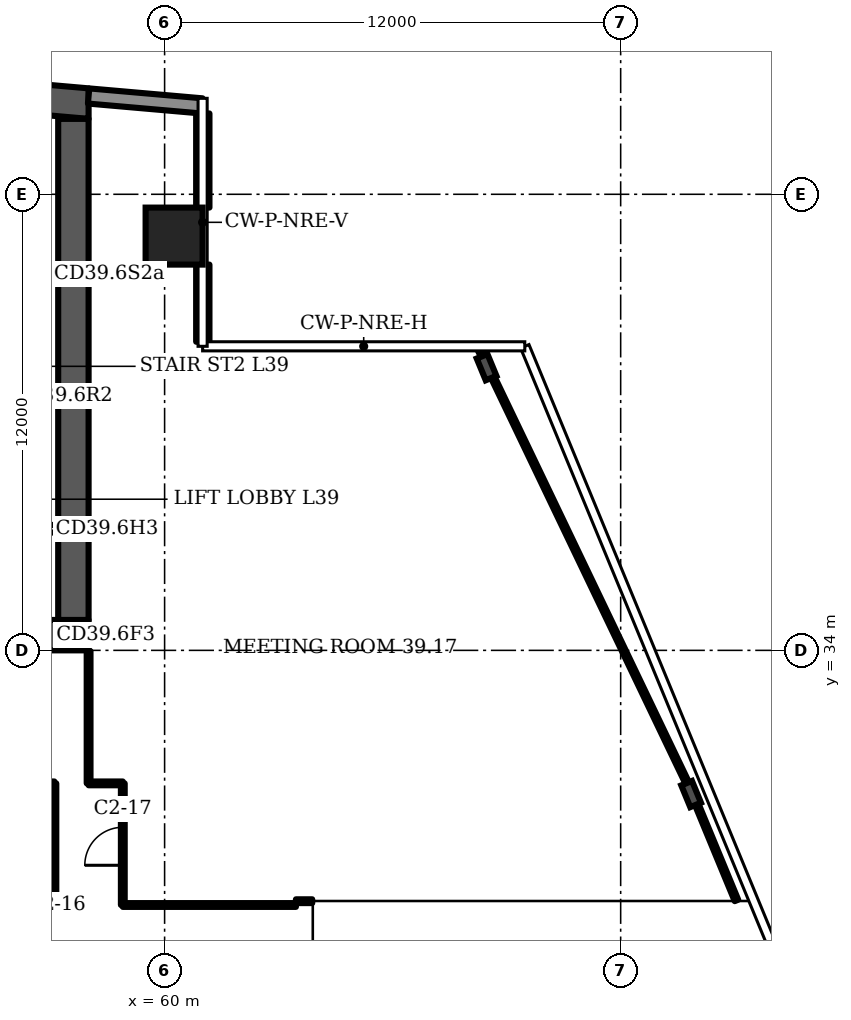
"""IFC4 building model, lengths in metres.
Left out: names, types, materials, properties, quantities, classifications, styles, units other than length and angle.
Written with IfcOpenShell. Run it as: python <this file> out.ifc"""

import sys

from ifc_helpers import new_model, si_unit, direction, frame, frame_2d, origin, origin_2d, place, context, subcontext, project, spatial, polyline, rectangle, i_section, outline, extrude, element, fill, save


model = new_model("IFC4")
c1 = context("Model", 3, precision=1e-05, world=origin(), true_north=direction((0.0, 1.0)))
c2 = subcontext(c1, "Body", "Model", "MODEL_VIEW")
j1 = project(units=[si_unit("LENGTHUNIT", "METRE"), si_unit("PLANEANGLEUNIT", "RADIAN")], contexts=[c1])
p1 = place(None, origin())
s1 = spatial("IfcSite", under=j1, at=p1, CompositionType="ELEMENT")
p2 = place(p1, origin())
s2 = spatial("IfcBuilding", under=s1, at=p2, CompositionType="ELEMENT")
p3 = place(p2, frame((0.0, 0.0, 162.7)))
s3 = spatial("IfcBuildingStorey", under=s2, at=p3, CompositionType="ELEMENT", Elevation=162.7)
p4 = place(p3, origin())
e1 = element("IfcWall", 1, at=p4, inside=s3, PredefinedType="SHEAR", context=c2, shape_type="SweptSolid", body=[
    extrude(outline(polyline([(16.0, 47.984), (37.0, 49.822), (58.0, 47.984), (58.0, 48.787), (37.0, 50.625), (16.0, 48.787), (16.0, 47.984)])), origin(), (0.0, 0.0, 1.0), 3.6),
])
p5 = place(p3, frame((16.0, 34.4, 0.0), z_axis=(0.0, 0.0, 1.0), x_axis=(1.0, 0.0, 0.0)))
e2 = element("IfcWall", 2, at=p5, inside=s3, PredefinedType="SHEAR", context=c2, shape_type="SweptSolid", body=[
    extrude(rectangle(XDim=42.0, YDim=0.8, at=frame_2d((21.0, 0.0))), origin(), (0.0, 0.0, 1.0), 3.6),
])
p6 = place(p5, frame((1.75, 0.0, 0.0)))
e3 = element("IfcOpeningElement", 3, at=p6, cuts=e2, PredefinedType="OPENING", context=c2, shape_type="SweptSolid", body=[
    extrude(rectangle(XDim=1.0, YDim=2.1, at=frame_2d((0.5, 1.05))), frame((0.0, 0.41, 0.0), z_axis=(0.0, -1.0, 0.0), x_axis=(1.0, 0.0, 0.0)), (0.0, 0.0, 1.0), 0.82),
])
p7 = place(p5, frame((4.65, 0.0, 0.0)))
e4 = element("IfcOpeningElement", 4, at=p7, cuts=e2, PredefinedType="OPENING", context=c2, shape_type="SweptSolid", body=[
    extrude(rectangle(XDim=1.0, YDim=2.1, at=frame_2d((0.5, 1.05))), frame((0.0, 0.41, 0.0), z_axis=(0.0, -1.0, 0.0), x_axis=(1.0, 0.0, 0.0)), (0.0, 0.0, 1.0), 0.82),
])
p8 = place(p5, frame((7.65, 0.0, 0.0)))
e5 = element("IfcOpeningElement", 5, at=p8, cuts=e2, PredefinedType="OPENING", context=c2, shape_type="SweptSolid", body=[
    extrude(rectangle(XDim=1.2, YDim=2.1, at=frame_2d((0.6, 1.05))), frame((0.0, 0.41, 0.0), z_axis=(0.0, -1.0, 0.0), x_axis=(1.0, 0.0, 0.0)), (0.0, 0.0, 1.0), 0.82),
])
p9 = place(p5, frame((14.767, 0.0, 0.0)))
e6 = element("IfcOpeningElement", 6, at=p9, cuts=e2, PredefinedType="OPENING", context=c2, shape_type="SweptSolid", body=[
    extrude(rectangle(XDim=1.1, YDim=2.1, at=frame_2d((0.55, 1.05))), frame((0.0, 0.41, 0.0), z_axis=(0.0, -1.0, 0.0), x_axis=(1.0, 0.0, 0.0)), (0.0, 0.0, 1.0), 0.82),
])
p10 = place(p5, frame((19.133, 0.0, 0.0)))
e7 = element("IfcOpeningElement", 7, at=p10, cuts=e2, PredefinedType="OPENING", context=c2, shape_type="SweptSolid", body=[
    extrude(rectangle(XDim=1.1, YDim=2.1, at=frame_2d((0.55, 1.05))), frame((0.0, 0.41, 0.0), z_axis=(0.0, -1.0, 0.0), x_axis=(1.0, 0.0, 0.0)), (0.0, 0.0, 1.0), 0.82),
])
p11 = place(p5, frame((16.8, 0.0, 0.0)))
e8 = element("IfcOpeningElement", 8, at=p11, cuts=e2, PredefinedType="OPENING", context=c2, shape_type="SweptSolid", body=[
    extrude(rectangle(XDim=1.4, YDim=2.1, at=frame_2d((0.7, 1.05))), frame((0.0, 0.41, 0.0), z_axis=(0.0, -1.0, 0.0), x_axis=(1.0, 0.0, 0.0)), (0.0, 0.0, 1.0), 0.82),
])
p12 = place(p5, frame((21.767, 0.0, 0.0)))
e9 = element("IfcOpeningElement", 9, at=p12, cuts=e2, PredefinedType="OPENING", context=c2, shape_type="SweptSolid", body=[
    extrude(rectangle(XDim=1.1, YDim=2.1, at=frame_2d((0.55, 1.05))), frame((0.0, 0.41, 0.0), z_axis=(0.0, -1.0, 0.0), x_axis=(1.0, 0.0, 0.0)), (0.0, 0.0, 1.0), 0.82),
])
p13 = place(p5, frame((23.95, 0.0, 0.0)))
e10 = element("IfcOpeningElement", 10, at=p13, cuts=e2, PredefinedType="OPENING", context=c2, shape_type="SweptSolid", body=[
    extrude(rectangle(XDim=1.1, YDim=2.1, at=frame_2d((0.55, 1.05))), frame((0.0, 0.41, 0.0), z_axis=(0.0, -1.0, 0.0), x_axis=(1.0, 0.0, 0.0)), (0.0, 0.0, 1.0), 0.82),
])
p14 = place(p5, frame((26.133, 0.0, 0.0)))
e11 = element("IfcOpeningElement", 11, at=p14, cuts=e2, PredefinedType="OPENING", context=c2, shape_type="SweptSolid", body=[
    extrude(rectangle(XDim=1.1, YDim=2.1, at=frame_2d((0.55, 1.05))), frame((0.0, 0.41, 0.0), z_axis=(0.0, -1.0, 0.0), x_axis=(1.0, 0.0, 0.0)), (0.0, 0.0, 1.0), 0.82),
])
p15 = place(p5, frame((33.15, 0.0, 0.0)))
e12 = element("IfcOpeningElement", 12, at=p15, cuts=e2, PredefinedType="OPENING", context=c2, shape_type="SweptSolid", body=[
    extrude(rectangle(XDim=1.2, YDim=2.1, at=frame_2d((0.6, 1.05))), frame((0.0, 0.41, 0.0), z_axis=(0.0, -1.0, 0.0), x_axis=(1.0, 0.0, 0.0)), (0.0, 0.0, 1.0), 0.82),
])
p16 = place(p5, frame((35.817, 0.0, 0.0)))
e13 = element("IfcOpeningElement", 13, at=p16, cuts=e2, PredefinedType="OPENING", context=c2, shape_type="SweptSolid", body=[
    extrude(rectangle(XDim=1.0, YDim=2.1, at=frame_2d((0.5, 1.05))), frame((0.0, 0.41, 0.0), z_axis=(0.0, -1.0, 0.0), x_axis=(1.0, 0.0, 0.0)), (0.0, 0.0, 1.0), 0.82),
])
p17 = place(p5, frame((39.95, 0.0, 0.0)))
e14 = element("IfcOpeningElement", 14, at=p17, cuts=e2, PredefinedType="OPENING", context=c2, shape_type="SweptSolid", body=[
    extrude(rectangle(XDim=1.0, YDim=2.1, at=frame_2d((0.5, 1.05))), frame((0.0, 0.41, 0.0), z_axis=(0.0, -1.0, 0.0), x_axis=(1.0, 0.0, 0.0)), (0.0, 0.0, 1.0), 0.82),
])
p18 = place(p5, frame((37.767, 0.0, 0.0)))
e15 = element("IfcOpeningElement", 15, at=p18, cuts=e2, PredefinedType="OPENING", context=c2, shape_type="SweptSolid", body=[
    extrude(rectangle(XDim=1.4, YDim=2.1, at=frame_2d((0.7, 1.05))), frame((0.0, 0.41, 0.0), z_axis=(0.0, -1.0, 0.0), x_axis=(1.0, 0.0, 0.0)), (0.0, 0.0, 1.0), 0.82),
])
p19 = place(p3, frame((57.6, 34.8, 0.0), z_axis=(0.0, 0.0, 1.0), x_axis=(0.0, 1.0, 0.0)))
e16 = element("IfcWall", 16, at=p19, inside=s3, PredefinedType="SHEAR", context=c2, shape_type="SweptSolid", body=[
    extrude(rectangle(XDim=13.184, YDim=0.8, at=frame_2d((6.592, 0.0))), origin(), (0.0, 0.0, 1.0), 3.6),
])
p20 = place(p3, frame((60.25, 44.9, 0.0), z_axis=(0.0, 0.0, 1.0), x_axis=(1.0, 0.0, 0.0)))
e17 = element("IfcColumn", 17, at=p20, inside=s3, PredefinedType="COLUMN", context=c2, shape_type="SweptSolid", body=[
    extrude(rectangle(XDim=1.5, YDim=1.5, at=origin_2d()), origin(), (0.0, 0.0, 1.0), 3.6),
])
for number, where, z_axis, x_axis in (
    (18, (73.854, 30.219, 0.0), (0.0, 0.0, 1.0), (0.924, 0.382, 0.0)),
    (19, (68.472, 41.45, 0.0), (0.0, 0.0, 1.0), (0.924, 0.382, 0.0)),
):
    element("IfcColumn", number, at=place(p3, frame(where, z_axis=z_axis, x_axis=x_axis)), inside=s3, PredefinedType="COLUMN", context=c2, shape_type="SweptSolid", body=[
        extrude(i_section(OverallWidth=0.305, OverallDepth=0.62, WebThickness=0.021, FlangeThickness=0.04, FilletRadius=0.027, at=origin_2d()), origin(), (0.0, 0.0, 1.0), 3.6),
    ])
p21 = place(p3, frame((60.983, 48.326, 0.0), z_axis=(0.0, 0.0, 1.0), x_axis=(-0.996194, 0.087168, 0.0)))
e20 = element("IfcWall", 20, at=p21, inside=s3, PredefinedType="SOLIDWALL", context=c2, shape_type="SweptSolid", body=[
    extrude(rectangle(XDim=2.994, YDim=0.4, at=frame_2d((1.497, 0.0))), origin(), (0.0, 0.0, 1.0), 3.2),
])
p22 = place(p3, frame((61.005, 42.12, 0.0), z_axis=(0.0, 0.0, 1.0), x_axis=(0.0, 1.0, 0.0)))
e21 = element("IfcWall", 21, at=p22, inside=s3, PredefinedType="SOLIDWALL", context=c2, shape_type="SweptSolid", body=[
    extrude(rectangle(XDim=2.03, YDim=0.35, at=frame_2d((1.015, 0.0))), origin(), (0.0, 0.0, 1.0), 1.0),
])
p23 = place(p3, frame((61.005, 45.65, 0.0), z_axis=(0.0, 0.0, 1.0), x_axis=(0.0, 1.0, 0.0)))
e22 = element("IfcWall", 22, at=p23, inside=s3, PredefinedType="SOLIDWALL", context=c2, shape_type="SweptSolid", body=[
    extrude(rectangle(XDim=2.477, YDim=0.35, at=frame_2d((1.238, 0.0))), origin(), (0.0, 0.0, 1.0), 1.0),
])
p24 = place(p3, frame((55.7, 37.2, 0.0), z_axis=(0.0, 0.0, 1.0), x_axis=(1.0, 0.0, 0.0)))
e23 = element("IfcWall", 23, at=p24, inside=s3, PredefinedType="PARTITIONING", context=c2, shape_type="SweptSolid", body=[
    extrude(rectangle(XDim=1.5, YDim=0.2, at=frame_2d((0.75, 0.0))), origin(), (0.0, 0.0, 1.0), 3.2),
])
p25 = place(p24, frame((0.25, 0.0, 0.0)))
e24 = element("IfcOpeningElement", 24, at=p25, cuts=e23, PredefinedType="OPENING", context=c2, shape_type="SweptSolid", body=[
    extrude(rectangle(XDim=1.0, YDim=2.1, at=frame_2d((0.5, 1.05))), frame((0.0, 0.11, 0.0), z_axis=(0.0, -1.0, 0.0), x_axis=(1.0, 0.0, 0.0)), (0.0, 0.0, 1.0), 0.22),
])
p26 = place(p3, frame((51.4, 40.7, 0.0), z_axis=(0.0, 0.0, 1.0), x_axis=(1.0, 0.0, 0.0)))
e25 = element("IfcWall", 25, at=p26, inside=s3, PredefinedType="PARTITIONING", context=c2, shape_type="SweptSolid", body=[
    extrude(rectangle(XDim=5.8, YDim=0.2, at=frame_2d((2.9, 0.0))), origin(), (0.0, 0.0, 1.0), 3.2),
])
p27 = place(p26, frame((0.367, 0.0, 0.0)))
e26 = element("IfcOpeningElement", 26, at=p27, cuts=e25, PredefinedType="OPENING", context=c2, shape_type="SweptSolid", body=[
    extrude(rectangle(XDim=1.1, YDim=2.1, at=frame_2d((0.55, 1.05))), frame((0.0, 0.11, 0.0), z_axis=(0.0, -1.0, 0.0), x_axis=(1.0, 0.0, 0.0)), (0.0, 0.0, 1.0), 0.22),
])
p28 = place(p26, frame((3.417, 0.0, 0.0)))
e27 = element("IfcOpeningElement", 27, at=p28, cuts=e25, PredefinedType="OPENING", context=c2, shape_type="SweptSolid", body=[
    extrude(rectangle(XDim=1.0, YDim=2.1, at=frame_2d((0.5, 1.05))), frame((0.0, 0.11, 0.0), z_axis=(0.0, -1.0, 0.0), x_axis=(1.0, 0.0, 0.0)), (0.0, 0.0, 1.0), 0.22),
])
p29 = place(p3, frame((51.4, 43.9, 0.0), z_axis=(0.0, 0.0, 1.0), x_axis=(1.0, 0.0, 0.0)))
e28 = element("IfcWall", 28, at=p29, inside=s3, PredefinedType="PARTITIONING", context=c2, shape_type="SweptSolid", body=[
    extrude(rectangle(XDim=5.8, YDim=0.2, at=frame_2d((2.9, 0.0))), origin(), (0.0, 0.0, 1.0), 3.2),
])
p30 = place(p29, frame((2.617, 0.0, 0.0)))
e29 = element("IfcOpeningElement", 29, at=p30, cuts=e28, PredefinedType="OPENING", context=c2, shape_type="SweptSolid", body=[
    extrude(rectangle(XDim=1.0, YDim=2.1, at=frame_2d((0.5, 1.05))), frame((0.0, 0.11, 0.0), z_axis=(0.0, -1.0, 0.0), x_axis=(1.0, 0.0, 0.0)), (0.0, 0.0, 1.0), 0.22),
])
p31 = place(p29, frame((4.5, 0.0, 0.0)))
e30 = element("IfcOpeningElement", 30, at=p31, cuts=e28, PredefinedType="OPENING", context=c2, shape_type="SweptSolid", body=[
    extrude(rectangle(XDim=1.0, YDim=2.1, at=frame_2d((0.5, 1.05))), frame((0.0, 0.11, 0.0), z_axis=(0.0, -1.0, 0.0), x_axis=(1.0, 0.0, 0.0)), (0.0, 0.0, 1.0), 0.22),
])
p32 = place(p3, frame((23.2, 27.3, 0.0), z_axis=(0.0, 0.0, 1.0), x_axis=(1.0, 0.0, 0.0)))
e31 = element("IfcWall", 31, at=p32, inside=s3, PredefinedType="PARTITIONING", context=c2, shape_type="SweptSolid", body=[
    extrude(rectangle(XDim=33.9, YDim=0.1, at=frame_2d((16.95, 0.0))), origin(), (0.0, 0.0, 1.0), 3.2),
])
p33 = place(p32, frame((16.3, 0.0, 0.0)))
e32 = element("IfcOpeningElement", 32, at=p33, cuts=e31, PredefinedType="OPENING", context=c2, shape_type="SweptSolid", body=[
    extrude(rectangle(XDim=1.0, YDim=2.1, at=frame_2d((0.5, 1.05))), frame((0.0, 0.06, 0.0), z_axis=(0.0, -1.0, 0.0), x_axis=(1.0, 0.0, 0.0)), (0.0, 0.0, 1.0), 0.12),
])
p34 = place(p32, frame((20.72, 0.0, 0.0)))
e33 = element("IfcOpeningElement", 33, at=p34, cuts=e31, PredefinedType="OPENING", context=c2, shape_type="SweptSolid", body=[
    extrude(rectangle(XDim=1.0, YDim=2.1, at=frame_2d((0.5, 1.05))), frame((0.0, 0.06, 0.0), z_axis=(0.0, -1.0, 0.0), x_axis=(1.0, 0.0, 0.0)), (0.0, 0.0, 1.0), 0.12),
])
p35 = place(p32, frame((23.54, 0.0, 0.0)))
e34 = element("IfcOpeningElement", 34, at=p35, cuts=e31, PredefinedType="OPENING", context=c2, shape_type="SweptSolid", body=[
    extrude(rectangle(XDim=1.0, YDim=2.1, at=frame_2d((0.5, 1.05))), frame((0.0, 0.06, 0.0), z_axis=(0.0, -1.0, 0.0), x_axis=(1.0, 0.0, 0.0)), (0.0, 0.0, 1.0), 0.12),
])
p36 = place(p32, frame((26.36, 0.0, 0.0)))
e35 = element("IfcOpeningElement", 35, at=p36, cuts=e31, PredefinedType="OPENING", context=c2, shape_type="SweptSolid", body=[
    extrude(rectangle(XDim=1.0, YDim=2.1, at=frame_2d((0.5, 1.05))), frame((0.0, 0.06, 0.0), z_axis=(0.0, -1.0, 0.0), x_axis=(1.0, 0.0, 0.0)), (0.0, 0.0, 1.0), 0.12),
])
p37 = place(p32, frame((29.18, 0.0, 0.0)))
e36 = element("IfcOpeningElement", 36, at=p37, cuts=e31, PredefinedType="OPENING", context=c2, shape_type="SweptSolid", body=[
    extrude(rectangle(XDim=1.0, YDim=2.1, at=frame_2d((0.5, 1.05))), frame((0.0, 0.06, 0.0), z_axis=(0.0, -1.0, 0.0), x_axis=(1.0, 0.0, 0.0)), (0.0, 0.0, 1.0), 0.12),
])
p38 = place(p32, frame((32.0, 0.0, 0.0)))
e37 = element("IfcOpeningElement", 37, at=p38, cuts=e31, PredefinedType="OPENING", context=c2, shape_type="SweptSolid", body=[
    extrude(rectangle(XDim=1.0, YDim=2.1, at=frame_2d((0.5, 1.05))), frame((0.0, 0.06, 0.0), z_axis=(0.0, -1.0, 0.0), x_axis=(1.0, 0.0, 0.0)), (0.0, 0.0, 1.0), 0.12),
])
p39 = place(p3, frame((57.1, 27.3, 0.0), z_axis=(0.0, 0.0, 1.0), x_axis=(0.0, 1.0, 0.0)))
e38 = element("IfcWall", 38, at=p39, inside=s3, PredefinedType="PARTITIONING", context=c2, shape_type="SweptSolid", body=[
    extrude(rectangle(XDim=3.2, YDim=0.1, at=frame_2d((1.6, 0.0))), origin(), (0.0, 0.0, 1.0), 3.2),
])
p40 = place(p3, frame((58.0, 30.5, 0.0), z_axis=(0.0, 0.0, 1.0), x_axis=(0.0, 1.0, 0.0)))
e39 = element("IfcWall", 39, at=p40, inside=s3, PredefinedType="PARTITIONING", context=c2, shape_type="SweptSolid", body=[
    extrude(rectangle(XDim=3.48, YDim=0.1, at=frame_2d((1.74, 0.0))), origin(), (0.0, 0.0, 1.0), 3.2),
])
p41 = place(p3, frame((58.0, 30.5, 0.0), z_axis=(0.0, 0.0, 1.0), x_axis=(1.0, 0.0, 0.0)))
e40 = element("IfcWall", 40, at=p41, inside=s3, PredefinedType="PARTITIONING", context=c2, shape_type="SweptSolid", body=[
    extrude(rectangle(XDim=0.9, YDim=0.1, at=frame_2d((0.45, 0.0))), origin(), (0.0, 0.0, 1.0), 3.2),
])
p42 = place(p3, frame((58.9, 27.3, 0.0), z_axis=(0.0, 0.0, 1.0), x_axis=(0.0, 1.0, 0.0)))
e41 = element("IfcWall", 41, at=p42, inside=s3, PredefinedType="PARTITIONING", context=c2, shape_type="SweptSolid", body=[
    extrude(rectangle(XDim=3.2, YDim=0.1, at=frame_2d((1.6, 0.0))), origin(), (0.0, 0.0, 1.0), 3.2),
])
p43 = place(p42, frame((1.045, 0.0, 0.0)))
e42 = element("IfcOpeningElement", 42, at=p43, cuts=e41, PredefinedType="OPENING", context=c2, shape_type="SweptSolid", body=[
    extrude(rectangle(XDim=1.0, YDim=2.1, at=frame_2d((0.5, 1.05))), frame((0.0, 0.06, 0.0), z_axis=(0.0, -1.0, 0.0), x_axis=(1.0, 0.0, 0.0)), (0.0, 0.0, 1.0), 0.12),
])
p44 = place(p3, frame((58.9, 27.3, 0.0), z_axis=(0.0, 0.0, 1.0), x_axis=(1.0, 0.0, 0.0)))
e43 = element("IfcWall", 43, at=p44, inside=s3, PredefinedType="PARTITIONING", context=c2, shape_type="SweptSolid", body=[
    extrude(rectangle(XDim=4.555, YDim=0.1, at=frame_2d((2.278, 0.0))), origin(), (0.0, 0.0, 1.0), 3.2),
])
p45 = place(p3, frame((63.455, 27.4, 0.0), z_axis=(0.0, 0.0, 1.0), x_axis=(1.0, 0.0, 0.0)))
e44 = element("IfcWall", 44, at=p45, inside=s3, PredefinedType="PARTITIONING", context=c2, shape_type="SweptSolid", body=[
    extrude(rectangle(XDim=0.429, YDim=0.1, at=frame_2d((0.215, 0.0))), origin(), (0.0, 0.0, 1.0), 3.2),
])
p46 = place(p3, frame((73.885, 30.23, 0.0), z_axis=(0.0, 0.0, 1.0), x_axis=(-0.432167, 0.90179, 0.0)))
e45 = element("IfcWall", 45, at=p46, inside=s3, PredefinedType="PARTITIONING", context=c2, shape_type="SweptSolid", body=[
    extrude(rectangle(XDim=13.036, YDim=0.1, at=frame_2d((6.518, 0.0))), origin(), (0.0, 0.0, 1.0), 3.2),
])
p47 = place(p3, frame((75.047, 27.42, 0.0), z_axis=(0.0, 0.0, 1.0), x_axis=(-0.382024, 0.924148, 0.0)))
e46 = element("IfcWall", 46, at=p47, inside=s3, PredefinedType="PARTITIONING", context=c2, shape_type="SweptSolid", body=[
    extrude(rectangle(XDim=3.041, YDim=0.1, at=frame_2d((1.521, 0.0))), origin(), (0.0, 0.0, 1.0), 2.58),
])
p48 = place(p3, frame((44.15, 30.5, 0.0), z_axis=(0.0, 0.0, 1.0), x_axis=(1.0, 0.0, 0.0)))
e47 = element("IfcWall", 47, at=p48, inside=s3, PredefinedType="PARTITIONING", context=c2, shape_type="SweptSolid", body=[
    extrude(rectangle(XDim=12.95, YDim=0.1, at=frame_2d((6.475, 0.0))), origin(), (0.0, 0.0, 1.0), 3.2),
])
p49 = place(p43, origin())
e48 = element("IfcDoor", 48, at=p49, inside=s3, OperationType="SINGLE_SWING_LEFT", PredefinedType="DOOR", context=c2, shape_type="SweptSolid", body=[
    extrude(rectangle(XDim=1.0, YDim=2.1, at=frame_2d((0.5, 1.05))), frame((0.0, 0.025, 0.0), z_axis=(0.0, -1.0, 0.0), x_axis=(1.0, 0.0, 0.0)), (0.0, 0.0, 1.0), 0.05),
])
fill(e42, e48)
save(model, sys.argv[1])
